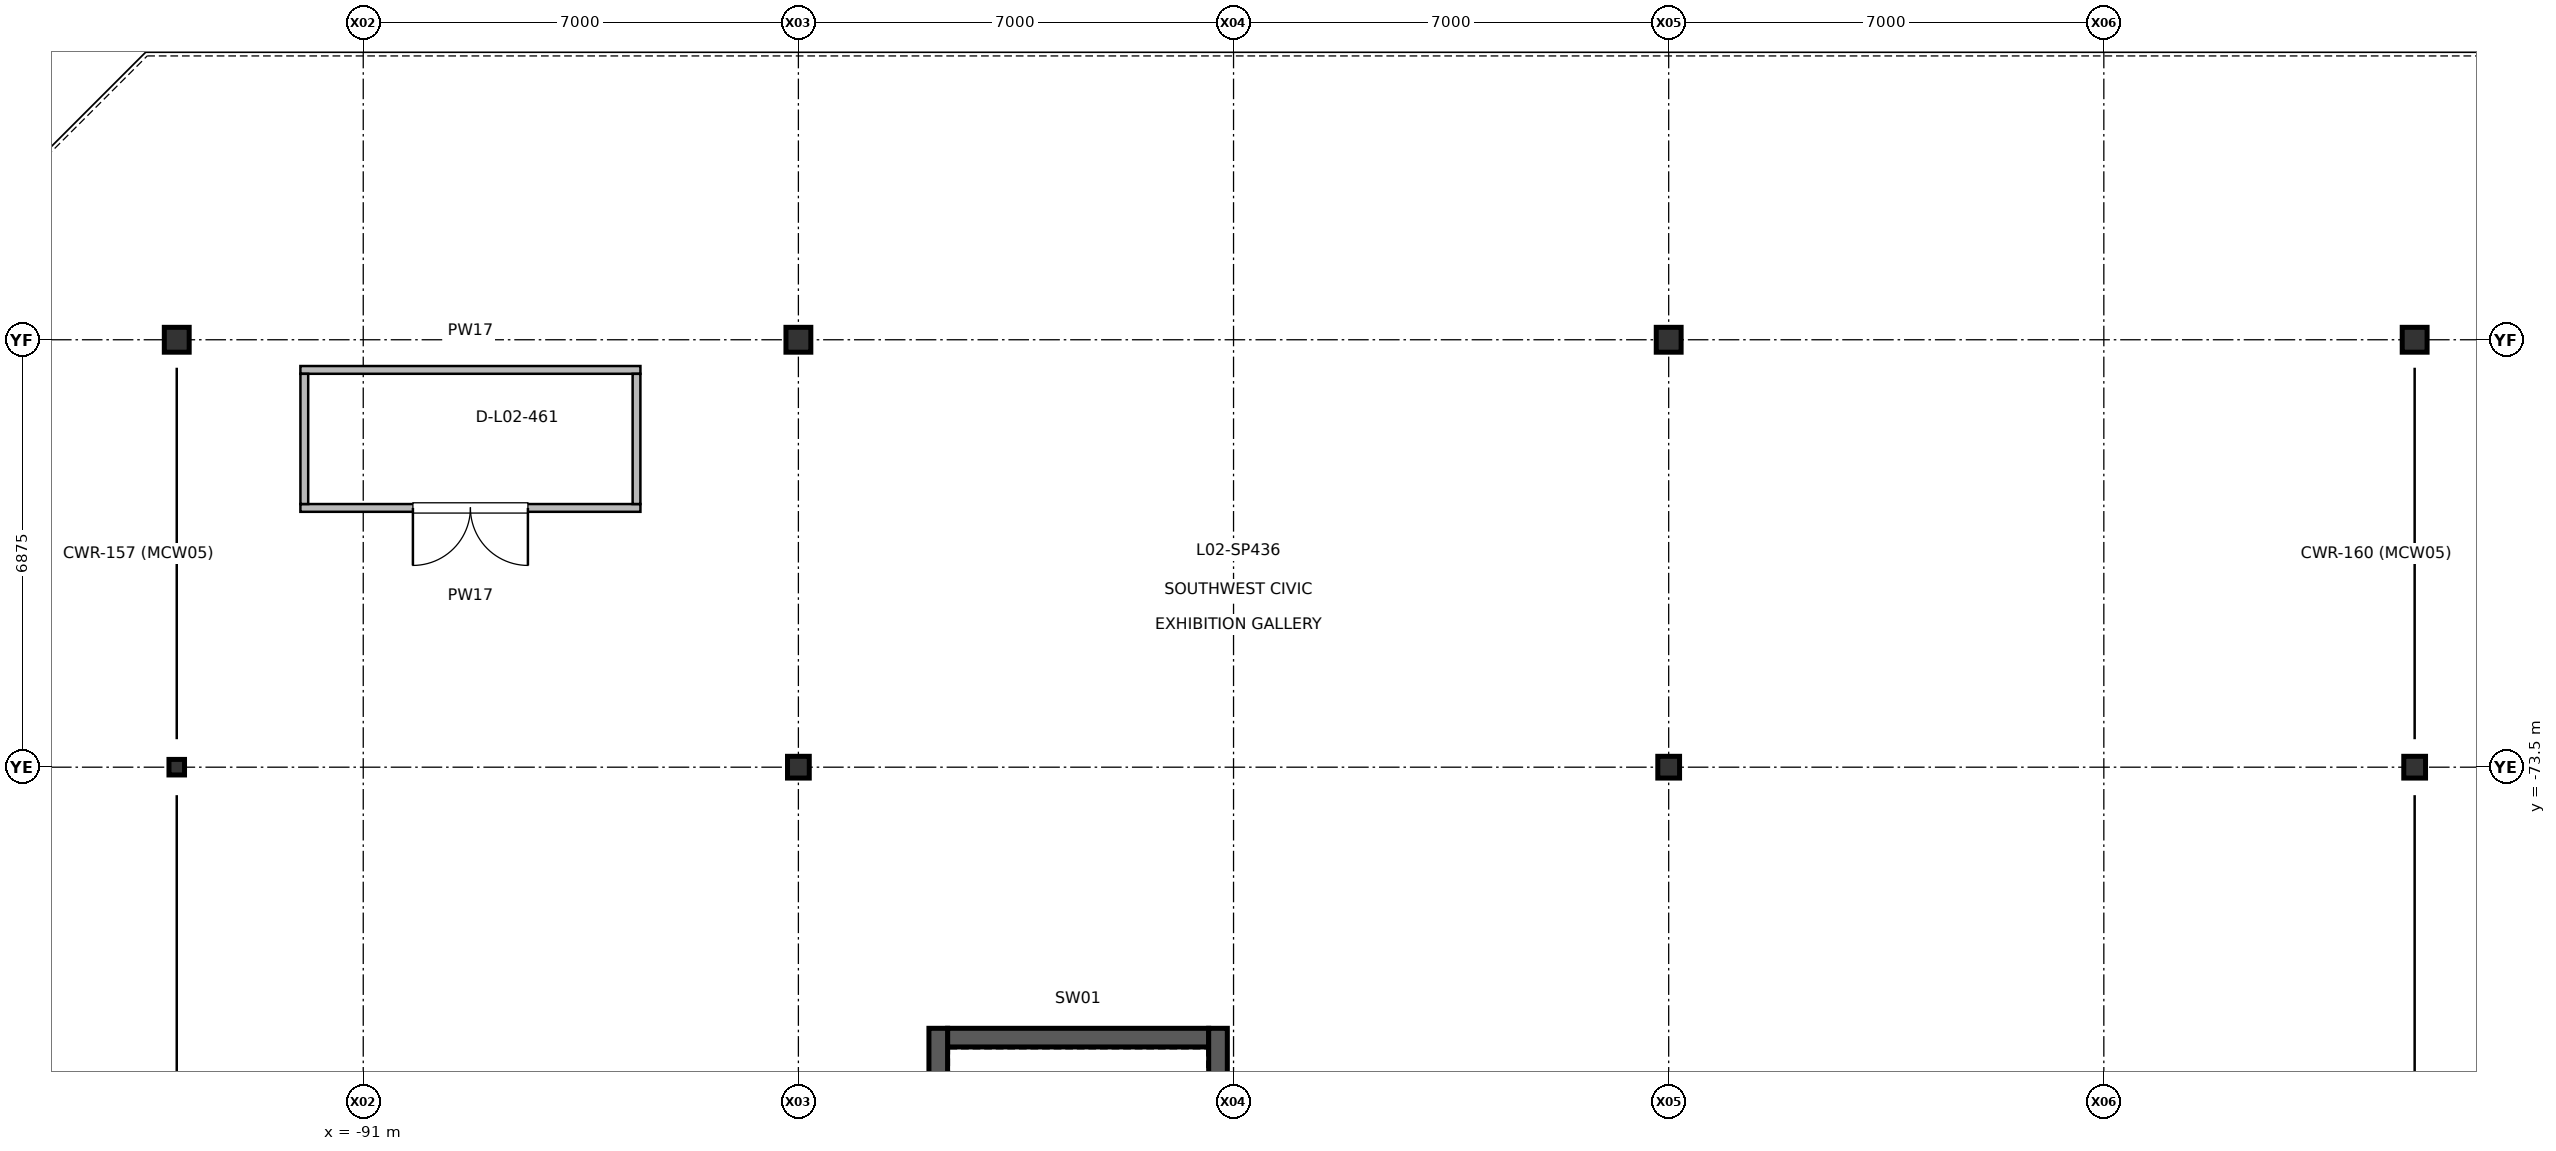
"""IFC4 building model, lengths in metres.
Left out: names, types, materials, properties, quantities, classifications, styles, units other than length and angle.
Written with IfcOpenShell. Run it as: python <this file> out.ifc"""

import sys

from ifc_helpers import new_model, si_unit, direction, frame, frame_2d, origin, origin_2d, place, context, subcontext, project, spatial, rectangle, i_section, extrude, element, fill, save


model = new_model("IFC4")
c1 = context("Model", 3, precision=1e-05, world=origin(), true_north=direction((0.0, 1.0)))
c2 = subcontext(c1, "Body", "Model", "MODEL_VIEW")
j1 = project(units=[si_unit("LENGTHUNIT", "METRE"), si_unit("PLANEANGLEUNIT", "RADIAN")], contexts=[c1])
p1 = place(None, origin())
s1 = spatial("IfcSite", under=j1, at=p1, CompositionType="ELEMENT")
p2 = place(p1, origin())
s2 = spatial("IfcBuilding", under=s1, at=p2, CompositionType="ELEMENT")
p3 = place(p2, frame((0.0, 0.0, 6.0)))
s3 = spatial("IfcBuildingStorey", under=s2, at=p3, CompositionType="ELEMENT", Elevation=6.0)
p4 = place(p3, frame((-94.0, -73.5, 0.0), z_axis=(0.0, 0.0, 1.0), x_axis=(1.0, 0.0, 0.0)))
e1 = element("IfcColumn", 1, at=p4, inside=s3, PredefinedType="COLUMN", context=c2, shape_type="SweptSolid", body=[
    extrude(i_section(OverallWidth=0.25, OverallDepth=0.25, WebThickness=0.009, FlangeThickness=0.014, at=origin_2d()), origin(), (0.0, 0.0, 1.0), 5.4),
])
p5 = place(p3, frame((-94.0, -66.625, 0.0), z_axis=(0.0, 0.0, 1.0), x_axis=(1.0, 0.0, 0.0)))
e2 = element("IfcColumn", 2, at=p5, inside=s3, PredefinedType="COLUMN", context=c2, shape_type="SweptSolid", body=[
    extrude(i_section(OverallWidth=0.4, OverallDepth=0.4, WebThickness=0.013, FlangeThickness=0.021, at=origin_2d()), origin(), (0.0, 0.0, 1.0), 5.4),
])
p6 = place(p3, frame((-84.0, -73.5, 0.0), z_axis=(0.0, 0.0, 1.0), x_axis=(1.0, 0.0, 0.0)))
e3 = element("IfcColumn", 3, at=p6, inside=s3, PredefinedType="COLUMN", context=c2, shape_type="SweptSolid", body=[
    extrude(i_section(OverallWidth=0.35, OverallDepth=0.35, WebThickness=0.012, FlangeThickness=0.019, at=origin_2d()), origin(), (0.0, 0.0, 1.0), 5.4),
])
p7 = place(p3, frame((-84.0, -66.625, 0.0), z_axis=(0.0, 0.0, 1.0), x_axis=(1.0, 0.0, 0.0)))
e4 = element("IfcColumn", 4, at=p7, inside=s3, PredefinedType="COLUMN", context=c2, shape_type="SweptSolid", body=[
    extrude(i_section(OverallWidth=0.4, OverallDepth=0.4, WebThickness=0.013, FlangeThickness=0.021, at=origin_2d()), origin(), (0.0, 0.0, 1.0), 5.4),
])
p8 = place(p3, frame((-70.0, -73.5, 0.0), z_axis=(0.0, 0.0, 1.0), x_axis=(1.0, 0.0, 0.0)))
e5 = element("IfcColumn", 5, at=p8, inside=s3, PredefinedType="COLUMN", context=c2, shape_type="SweptSolid", body=[
    extrude(i_section(OverallWidth=0.35, OverallDepth=0.35, WebThickness=0.012, FlangeThickness=0.019, at=origin_2d()), origin(), (0.0, 0.0, 1.0), 5.4),
])
p9 = place(p3, frame((-70.0, -66.625, 0.0), z_axis=(0.0, 0.0, 1.0), x_axis=(1.0, 0.0, 0.0)))
e6 = element("IfcColumn", 6, at=p9, inside=s3, PredefinedType="COLUMN", context=c2, shape_type="SweptSolid", body=[
    extrude(i_section(OverallWidth=0.4, OverallDepth=0.4, WebThickness=0.013, FlangeThickness=0.021, at=origin_2d()), origin(), (0.0, 0.0, 1.0), 5.4),
])
p10 = place(p3, frame((-58.0, -73.5, 0.0), z_axis=(0.0, 0.0, 1.0), x_axis=(1.0, 0.0, 0.0)))
e7 = element("IfcColumn", 7, at=p10, inside=s3, PredefinedType="COLUMN", context=c2, shape_type="SweptSolid", body=[
    extrude(i_section(OverallWidth=0.35, OverallDepth=0.35, WebThickness=0.012, FlangeThickness=0.019, at=origin_2d()), origin(), (0.0, 0.0, 1.0), 5.4),
])
p11 = place(p3, frame((-58.0, -66.625, 0.0), z_axis=(0.0, 0.0, 1.0), x_axis=(1.0, 0.0, 0.0)))
e8 = element("IfcColumn", 8, at=p11, inside=s3, PredefinedType="COLUMN", context=c2, shape_type="SweptSolid", body=[
    extrude(i_section(OverallWidth=0.4, OverallDepth=0.4, WebThickness=0.013, FlangeThickness=0.021, at=origin_2d()), origin(), (0.0, 0.0, 1.0), 5.4),
])
p12 = place(p3, frame((-86.541, -69.33, 0.0), z_axis=(0.0, 0.0, 1.0), x_axis=(-1.0, 0.0, 0.0)))
e9 = element("IfcWall", 9, at=p12, inside=s3, PredefinedType="PARTITIONING", context=c2, shape_type="SweptSolid", body=[
    extrude(rectangle(XDim=5.47, YDim=0.125, at=frame_2d((2.735, 0.0))), origin(), (0.0, 0.0, 1.0), 4.42),
])
p13 = place(p12, frame((1.81, 0.0, 0.0)))
e10 = element("IfcOpeningElement", 10, at=p13, cuts=e9, PredefinedType="OPENING", context=c2, shape_type="SweptSolid", body=[
    extrude(rectangle(XDim=1.85, YDim=2.4, at=frame_2d((0.925, 1.2))), frame((0.0, 0.073, 0.0), z_axis=(0.0, -1.0, 0.0), x_axis=(1.0, 0.0, 0.0)), (0.0, 0.0, 1.0), 0.145),
])
p14 = place(p3, frame((-92.011, -67.11, 0.0), z_axis=(0.0, 0.0, 1.0), x_axis=(1.0, 0.0, 0.0)))
e11 = element("IfcWall", 11, at=p14, inside=s3, PredefinedType="PARTITIONING", context=c2, shape_type="SweptSolid", body=[
    extrude(rectangle(XDim=5.47, YDim=0.125, at=frame_2d((2.735, 0.0))), origin(), (0.0, 0.0, 1.0), 4.42),
])
for number, where, z_axis, x_axis in (
    (12, (-91.948, -69.267, 0.0), (0.0, 0.0, 1.0), (0.0, 1.0, 0.0)),
    (13, (-86.604, -69.267, 0.0), (0.0, 0.0, 1.0), (0.0, 1.0, 0.0)),
):
    element("IfcWall", number, at=place(p3, frame(where, z_axis=z_axis, x_axis=x_axis)), inside=s3, PredefinedType="PARTITIONING", context=c2, shape_type="SweptSolid", body=[
        extrude(rectangle(XDim=2.094, YDim=0.125, at=frame_2d((1.047, 0.0))), origin(), (0.0, 0.0, 1.0), 4.42),
    ])
p15 = place(p3, frame((-81.6, -77.85, 0.0), z_axis=(0.0, 0.0, 1.0), x_axis=(1.0, 0.0, 0.0)))
e14 = element("IfcWall", 14, at=p15, inside=s3, PredefinedType="SHEAR", context=c2, shape_type="SweptSolid", body=[
    extrude(rectangle(XDim=4.2, YDim=0.3, at=frame_2d((2.1, 0.0))), origin(), (0.0, 0.0, 1.0), 5.15),
])
for number, where, z_axis, x_axis in (
    (15, (-81.75, -86.15, 0.0), (0.0, 0.0, 1.0), (0.0, 1.0, 0.0)),
    (16, (-77.25, -86.15, 0.0), (0.0, 0.0, 1.0), (0.0, 1.0, 0.0)),
):
    element("IfcWall", number, at=place(p3, frame(where, z_axis=z_axis, x_axis=x_axis)), inside=s3, PredefinedType="SHEAR", context=c2, shape_type="SweptSolid", body=[
        extrude(rectangle(XDim=8.45, YDim=0.3, at=frame_2d((4.225, 0.0))), origin(), (0.0, 0.0, 1.0), 5.15),
    ])
p16 = place(p13, origin())
e17 = element("IfcDoor", 17, at=p16, inside=s3, OperationType="DOUBLE_DOOR_SINGLE_SWING", PredefinedType="DOOR", context=c2, shape_type="SweptSolid", body=[
    extrude(rectangle(XDim=1.85, YDim=2.4, at=frame_2d((0.925, 1.2))), frame((0.0, 0.025, 0.0), z_axis=(0.0, -1.0, 0.0), x_axis=(1.0, 0.0, 0.0)), (0.0, 0.0, 1.0), 0.05),
])
fill(e10, e17)
save(model, sys.argv[1])
